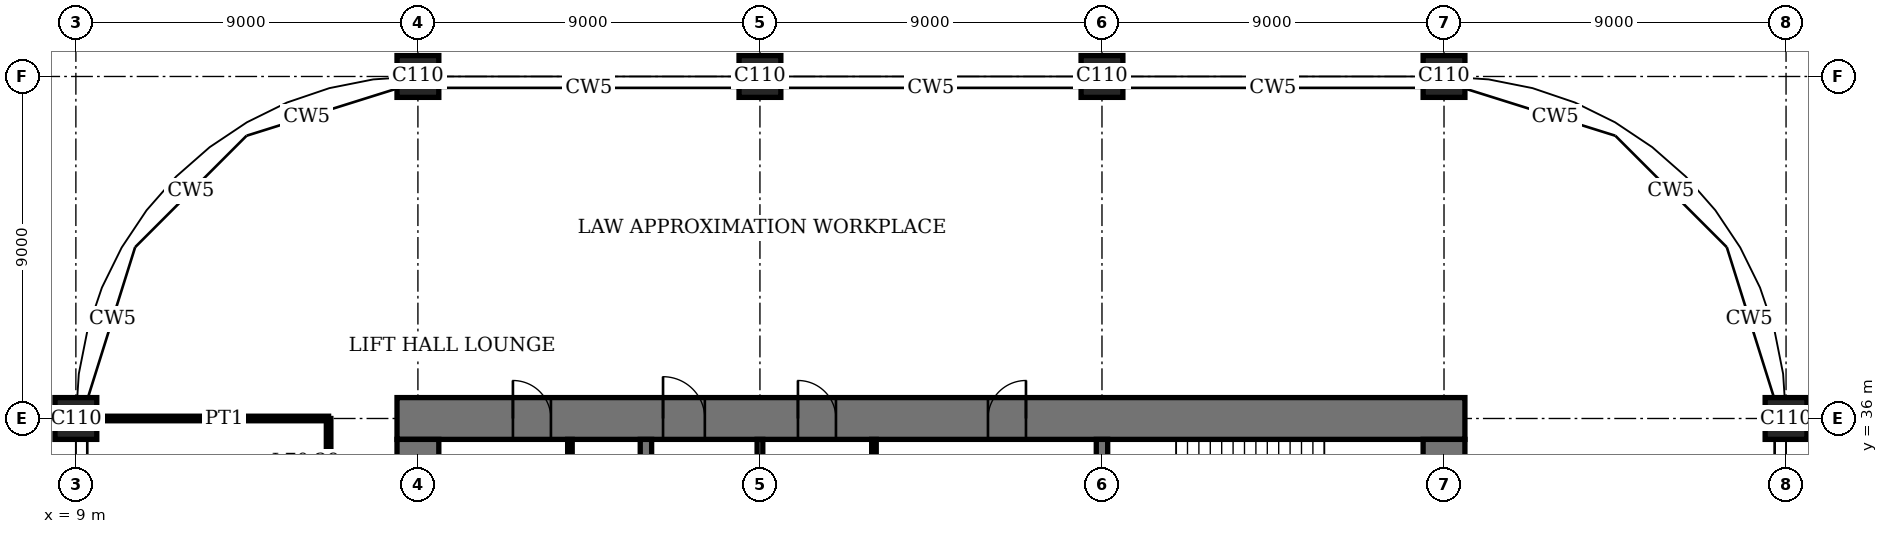
"""IFC4 building model, lengths in metres.
Left out: names, types, materials, properties, quantities, classifications, styles, units other than length and angle.
Written with IfcOpenShell. Run it as: python <this file> out.ifc"""

import sys

from ifc_helpers import new_model, si_unit, direction, frame, frame_2d, origin, origin_2d, place, context, subcontext, project, spatial, rectangle, extrude, element, fill, save


model = new_model("IFC4")
c1 = context("Model", 3, precision=1e-05, world=origin(), true_north=direction((0.0, 1.0)))
c2 = subcontext(c1, "Body", "Model", "MODEL_VIEW")
j1 = project(units=[si_unit("LENGTHUNIT", "METRE"), si_unit("PLANEANGLEUNIT", "RADIAN")], contexts=[c1])
p1 = place(None, origin())
s1 = spatial("IfcSite", under=j1, at=p1, CompositionType="ELEMENT")
p2 = place(p1, origin())
s2 = spatial("IfcBuilding", under=s1, at=p2, CompositionType="ELEMENT")
p3 = place(p2, frame((0.0, 0.0, 287.4)))
s3 = spatial("IfcBuildingStorey", under=s2, at=p3, CompositionType="ELEMENT", Elevation=287.4)
for number, where, z_axis, x_axis in (
    (1, (9.0, 36.0, 0.0), (0.0, 0.0, 1.0), (1.0, 0.0, 0.0)),
    (2, (18.0, 45.0, 0.0), (0.0, 0.0, 1.0), (1.0, 0.0, 0.0)),
    (3, (27.0, 45.0, 0.0), (0.0, 0.0, 1.0), (1.0, 0.0, 0.0)),
    (4, (36.0, 45.0, 0.0), (0.0, 0.0, 1.0), (1.0, 0.0, 0.0)),
    (5, (45.0, 45.0, 0.0), (0.0, 0.0, 1.0), (1.0, 0.0, 0.0)),
    (6, (54.0, 36.0, 0.0), (0.0, 0.0, 1.0), (1.0, 0.0, 0.0)),
):
    element("IfcColumn", number, at=place(p3, frame(where, z_axis=z_axis, x_axis=x_axis)), inside=s3, PredefinedType="COLUMN", context=c2, shape_type="SweptSolid", body=[
        extrude(rectangle(XDim=1.1, YDim=1.1, at=origin_2d()), origin(), (0.0, 0.0, 1.0), 4.0),
    ])
p4 = place(p3, frame((45.55, 36.0, 0.0), z_axis=(0.0, 0.0, 1.0), x_axis=(-1.0, 0.0, 0.0)))
e7 = element("IfcWall", 7, at=p4, inside=s3, PredefinedType="SHEAR", context=c2, shape_type="SweptSolid", body=[
    extrude(rectangle(XDim=28.1, YDim=1.1, at=frame_2d((14.05, 0.0))), origin(), (0.0, 0.0, 1.0), 4.0),
])
p5 = place(p4, frame((11.55, 0.0, 0.0)))
e8 = element("IfcOpeningElement", 8, at=p5, cuts=e7, PredefinedType="OPENING", context=c2, shape_type="SweptSolid", body=[
    extrude(rectangle(XDim=1.0, YDim=2.4, at=frame_2d((0.5, 1.2))), frame((0.0, 0.56, 0.0), z_axis=(0.0, -1.0, 0.0), x_axis=(1.0, 0.0, 0.0)), (0.0, 0.0, 1.0), 1.12),
])
p6 = place(p4, frame((16.55, 0.0, 0.0)))
e9 = element("IfcOpeningElement", 9, at=p6, cuts=e7, PredefinedType="OPENING", context=c2, shape_type="SweptSolid", body=[
    extrude(rectangle(XDim=1.0, YDim=2.4, at=frame_2d((0.5, 1.2))), frame((0.0, 0.56, 0.0), z_axis=(0.0, -1.0, 0.0), x_axis=(1.0, 0.0, 0.0)), (0.0, 0.0, 1.0), 1.12),
])
p7 = place(p4, frame((20.0, 0.0, 0.0)))
e10 = element("IfcOpeningElement", 10, at=p7, cuts=e7, PredefinedType="OPENING", context=c2, shape_type="SweptSolid", body=[
    extrude(rectangle(XDim=1.1, YDim=2.4, at=frame_2d((0.55, 1.2))), frame((0.0, 0.56, 0.0), z_axis=(0.0, -1.0, 0.0), x_axis=(1.0, 0.0, 0.0)), (0.0, 0.0, 1.0), 1.12),
])
p8 = place(p4, frame((24.05, 0.0, 0.0)))
e11 = element("IfcOpeningElement", 11, at=p8, cuts=e7, PredefinedType="OPENING", context=c2, shape_type="SweptSolid", body=[
    extrude(rectangle(XDim=1.0, YDim=2.4, at=frame_2d((0.5, 1.2))), frame((0.0, 0.56, 0.0), z_axis=(0.0, -1.0, 0.0), x_axis=(1.0, 0.0, 0.0)), (0.0, 0.0, 1.0), 1.12),
])
p9 = place(p3, frame((18.0, 35.45, 0.0), z_axis=(0.0, 0.0, 1.0), x_axis=(0.0, -1.0, 0.0)))
e12 = element("IfcWall", 12, at=p9, inside=s3, PredefinedType="SHEAR", context=c2, shape_type="SweptSolid", body=[
    extrude(rectangle(XDim=16.9, YDim=1.1, at=frame_2d((8.45, 0.0))), origin(), (0.0, 0.0, 1.0), 4.0),
])
p10 = place(p9, frame((8.45, 0.0, 0.0)))
e13 = element("IfcOpeningElement", 13, at=p10, cuts=e12, PredefinedType="OPENING", context=c2, shape_type="SweptSolid", body=[
    extrude(rectangle(XDim=1.8, YDim=2.4, at=frame_2d((0.9, 1.2))), frame((0.0, 0.56, 0.0), z_axis=(0.0, -1.0, 0.0), x_axis=(1.0, 0.0, 0.0)), (0.0, 0.0, 1.0), 1.12),
])
p11 = place(p3, frame((45.0, 18.55, 0.0), z_axis=(0.0, 0.0, 1.0), x_axis=(0.0, 1.0, 0.0)))
e14 = element("IfcWall", 14, at=p11, inside=s3, PredefinedType="SHEAR", context=c2, shape_type="SweptSolid", body=[
    extrude(rectangle(XDim=16.9, YDim=1.1, at=frame_2d((8.45, 0.0))), origin(), (0.0, 0.0, 1.0), 4.0),
])
p12 = place(p11, frame((8.45, 0.0, 0.0)))
e15 = element("IfcOpeningElement", 15, at=p12, cuts=e14, PredefinedType="OPENING", context=c2, shape_type="SweptSolid", body=[
    extrude(rectangle(XDim=1.8, YDim=2.4, at=frame_2d((0.9, 1.2))), frame((0.0, 0.56, 0.0), z_axis=(0.0, -1.0, 0.0), x_axis=(1.0, 0.0, 0.0)), (0.0, 0.0, 1.0), 1.12),
])
p13 = place(p3, frame((36.0, 32.4, 0.0), z_axis=(0.0, 0.0, 1.0), x_axis=(0.0, 1.0, 0.0)))
e16 = element("IfcWall", 16, at=p13, inside=s3, PredefinedType="SHEAR", context=c2, shape_type="SweptSolid", body=[
    extrude(rectangle(XDim=3.05, YDim=0.3, at=frame_2d((1.525, 0.0))), origin(), (0.0, 0.0, 1.0), 4.0),
])
p14 = place(p3, frame((24.0, 29.55, 0.0), z_axis=(0.0, 0.0, 1.0), x_axis=(0.0, 1.0, 0.0)))
e17 = element("IfcWall", 17, at=p14, inside=s3, PredefinedType="SHEAR", context=c2, shape_type="SweptSolid", body=[
    extrude(rectangle(XDim=5.9, YDim=0.3, at=frame_2d((2.95, 0.0))), origin(), (0.0, 0.0, 1.0), 4.0),
])
p15 = place(p3, frame((9.55, 36.0, 0.0), z_axis=(0.0, 0.0, 1.0), x_axis=(1.0, 0.0, 0.0)))
e18 = element("IfcWall", 18, at=p15, inside=s3, PredefinedType="PARTITIONING", context=c2, shape_type="SweptSolid", body=[
    extrude(rectangle(XDim=6.1, YDim=0.12, at=frame_2d((3.05, 0.0))), origin(), (0.0, 0.0, 1.0), 3.05),
])
p16 = place(p3, frame((15.65, 31.5, 0.0), z_axis=(0.0, 0.0, 1.0), x_axis=(0.0, 1.0, 0.0)))
e19 = element("IfcWall", 19, at=p16, inside=s3, PredefinedType="PARTITIONING", context=c2, shape_type="SweptSolid", body=[
    extrude(rectangle(XDim=4.5, YDim=0.12, at=frame_2d((2.25, 0.0))), origin(), (0.0, 0.0, 1.0), 3.75),
])
p17 = place(p16, frame((1.75, 0.0, 0.0)))
e20 = element("IfcOpeningElement", 20, at=p17, cuts=e19, PredefinedType="OPENING", context=c2, shape_type="SweptSolid", body=[
    extrude(rectangle(XDim=1.0, YDim=2.4, at=frame_2d((0.5, 1.2))), frame((0.0, 0.07, 0.0), z_axis=(0.0, -1.0, 0.0), x_axis=(1.0, 0.0, 0.0)), (0.0, 0.0, 1.0), 0.14),
])
p18 = place(p3, frame((30.0, 32.55, 0.0), z_axis=(0.0, 0.0, 1.0), x_axis=(0.0, 1.0, 0.0)))
e21 = element("IfcWall", 21, at=p18, inside=s3, PredefinedType="PARTITIONING", context=c2, shape_type="SweptSolid", body=[
    extrude(rectangle(XDim=2.9, YDim=0.12, at=frame_2d((1.45, 0.0))), origin(), (0.0, 0.0, 1.0), 3.75),
])
p19 = place(p3, frame((27.0, 32.55, 0.0), z_axis=(0.0, 0.0, 1.0), x_axis=(0.0, 1.0, 0.0)))
e22 = element("IfcWall", 22, at=p19, inside=s3, PredefinedType="PARTITIONING", context=c2, shape_type="SweptSolid", body=[
    extrude(rectangle(XDim=2.9, YDim=0.15, at=frame_2d((1.45, 0.0))), origin(), (0.0, 0.0, 1.0), 3.75),
])
p20 = place(p3, frame((22.0, 32.55, 0.0), z_axis=(0.0, 0.0, 1.0), x_axis=(0.0, 1.0, 0.0)))
e23 = element("IfcWall", 23, at=p20, inside=s3, PredefinedType="PARTITIONING", context=c2, shape_type="SweptSolid", body=[
    extrude(rectangle(XDim=2.9, YDim=0.12, at=frame_2d((1.45, 0.0))), origin(), (0.0, 0.0, 1.0), 3.75),
])
p21 = place(p20, frame((0.95, 0.0, 0.0)))
e24 = element("IfcOpeningElement", 24, at=p21, cuts=e23, PredefinedType="OPENING", context=c2, shape_type="SweptSolid", body=[
    extrude(rectangle(XDim=1.0, YDim=2.4, at=frame_2d((0.5, 1.2))), frame((0.0, 0.07, 0.0), z_axis=(0.0, -1.0, 0.0), x_axis=(1.0, 0.0, 0.0)), (0.0, 0.0, 1.0), 0.14),
])
p22 = place(p5, origin())
e25 = element("IfcDoor", 25, at=p22, inside=s3, OperationType="SINGLE_SWING_LEFT", PredefinedType="DOOR", context=c2, shape_type="SweptSolid", body=[
    extrude(rectangle(XDim=1.0, YDim=2.4, at=frame_2d((0.5, 1.2))), frame((0.0, 0.025, 0.0), z_axis=(0.0, -1.0, 0.0), x_axis=(1.0, 0.0, 0.0)), (0.0, 0.0, 1.0), 0.05),
    extrude(rectangle(XDim=0.04, YDim=2.4, at=frame_2d((0.02, 1.2))), frame((0.0, 0.4, 0.0), z_axis=(0.0, -1.0, 0.0), x_axis=(1.0, 0.0, 0.0)), (0.0, 0.0, 1.0), 0.8),
    extrude(rectangle(XDim=0.04, YDim=2.4, at=frame_2d((0.98, 1.2))), frame((0.0, 0.4, 0.0), z_axis=(0.0, -1.0, 0.0), x_axis=(1.0, 0.0, 0.0)), (0.0, 0.0, 1.0), 0.8),
    extrude(rectangle(XDim=1.0, YDim=0.04, at=frame_2d((0.5, 2.38))), frame((0.0, 0.4, 0.0), z_axis=(0.0, -1.0, 0.0), x_axis=(1.0, 0.0, 0.0)), (0.0, 0.0, 1.0), 0.8),
])
fill(e8, e25)
p23 = place(p6, origin())
e26 = element("IfcDoor", 26, at=p23, inside=s3, OperationType="SINGLE_SWING_RIGHT", PredefinedType="DOOR", context=c2, shape_type="SweptSolid", body=[
    extrude(rectangle(XDim=1.0, YDim=2.4, at=frame_2d((0.5, 1.2))), frame((0.0, 0.025, 0.0), z_axis=(0.0, -1.0, 0.0), x_axis=(1.0, 0.0, 0.0)), (0.0, 0.0, 1.0), 0.05),
    extrude(rectangle(XDim=0.04, YDim=2.4, at=frame_2d((0.02, 1.2))), frame((0.0, 0.4, 0.0), z_axis=(0.0, -1.0, 0.0), x_axis=(1.0, 0.0, 0.0)), (0.0, 0.0, 1.0), 0.8),
    extrude(rectangle(XDim=0.04, YDim=2.4, at=frame_2d((0.98, 1.2))), frame((0.0, 0.4, 0.0), z_axis=(0.0, -1.0, 0.0), x_axis=(1.0, 0.0, 0.0)), (0.0, 0.0, 1.0), 0.8),
    extrude(rectangle(XDim=1.0, YDim=0.04, at=frame_2d((0.5, 2.38))), frame((0.0, 0.4, 0.0), z_axis=(0.0, -1.0, 0.0), x_axis=(1.0, 0.0, 0.0)), (0.0, 0.0, 1.0), 0.8),
])
fill(e9, e26)
p24 = place(p7, origin())
e27 = element("IfcDoor", 27, at=p24, inside=s3, OperationType="SINGLE_SWING_RIGHT", PredefinedType="DOOR", context=c2, shape_type="SweptSolid", body=[
    extrude(rectangle(XDim=1.1, YDim=2.4, at=frame_2d((0.55, 1.2))), frame((0.0, 0.025, 0.0), z_axis=(0.0, -1.0, 0.0), x_axis=(1.0, 0.0, 0.0)), (0.0, 0.0, 1.0), 0.05),
    extrude(rectangle(XDim=0.04, YDim=2.4, at=frame_2d((0.02, 1.2))), frame((0.0, 0.44, 0.0), z_axis=(0.0, -1.0, 0.0), x_axis=(1.0, 0.0, 0.0)), (0.0, 0.0, 1.0), 0.88),
    extrude(rectangle(XDim=0.04, YDim=2.4, at=frame_2d((1.08, 1.2))), frame((0.0, 0.44, 0.0), z_axis=(0.0, -1.0, 0.0), x_axis=(1.0, 0.0, 0.0)), (0.0, 0.0, 1.0), 0.88),
    extrude(rectangle(XDim=1.1, YDim=0.04, at=frame_2d((0.55, 2.38))), frame((0.0, 0.44, 0.0), z_axis=(0.0, -1.0, 0.0), x_axis=(1.0, 0.0, 0.0)), (0.0, 0.0, 1.0), 0.88),
])
fill(e10, e27)
p25 = place(p8, origin())
e28 = element("IfcDoor", 28, at=p25, inside=s3, OperationType="SINGLE_SWING_RIGHT", PredefinedType="DOOR", context=c2, shape_type="SweptSolid", body=[
    extrude(rectangle(XDim=1.0, YDim=2.4, at=frame_2d((0.5, 1.2))), frame((0.0, 0.025, 0.0), z_axis=(0.0, -1.0, 0.0), x_axis=(1.0, 0.0, 0.0)), (0.0, 0.0, 1.0), 0.05),
    extrude(rectangle(XDim=0.04, YDim=2.4, at=frame_2d((0.02, 1.2))), frame((0.0, 0.4, 0.0), z_axis=(0.0, -1.0, 0.0), x_axis=(1.0, 0.0, 0.0)), (0.0, 0.0, 1.0), 0.8),
    extrude(rectangle(XDim=0.04, YDim=2.4, at=frame_2d((0.98, 1.2))), frame((0.0, 0.4, 0.0), z_axis=(0.0, -1.0, 0.0), x_axis=(1.0, 0.0, 0.0)), (0.0, 0.0, 1.0), 0.8),
    extrude(rectangle(XDim=1.0, YDim=0.04, at=frame_2d((0.5, 2.38))), frame((0.0, 0.4, 0.0), z_axis=(0.0, -1.0, 0.0), x_axis=(1.0, 0.0, 0.0)), (0.0, 0.0, 1.0), 0.8),
])
fill(e11, e28)
save(model, sys.argv[1])
